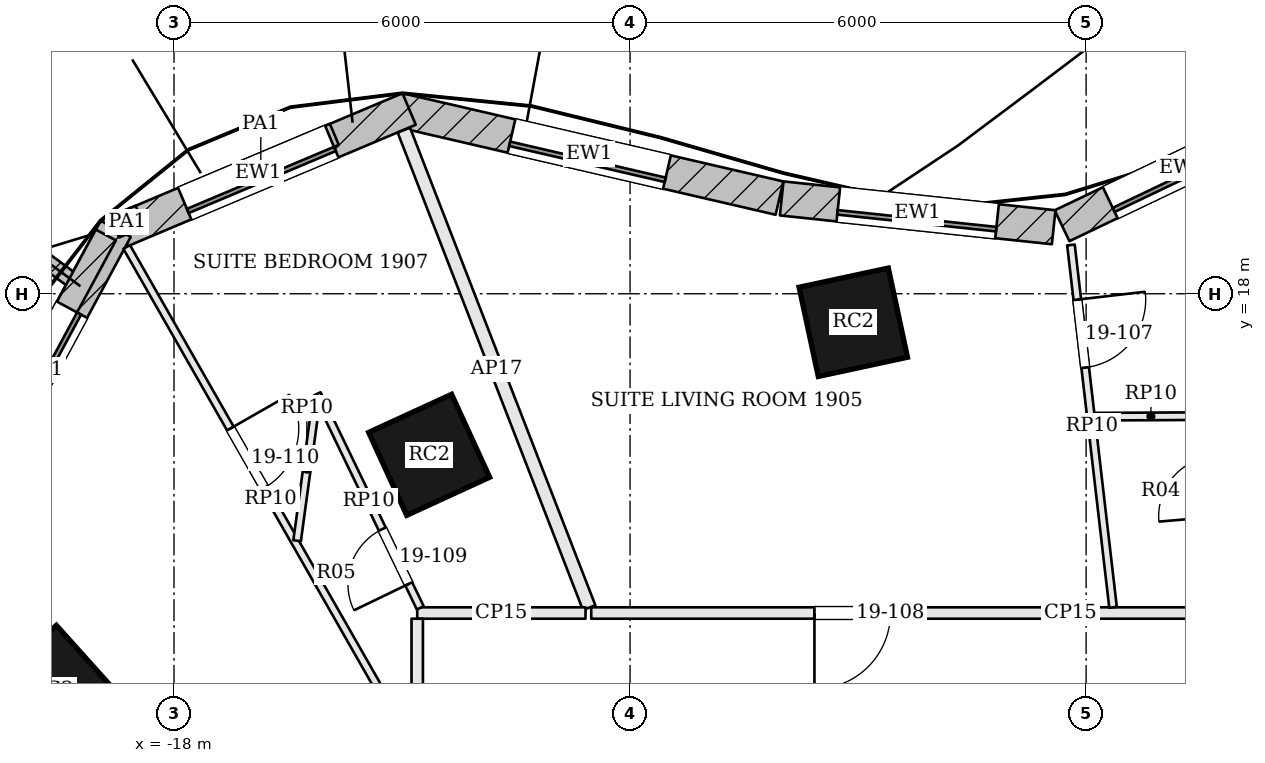
"""IFC4 building model, lengths in metres.
Left out: names, types, materials, properties, quantities, classifications, styles, units other than length and angle.
Written with IfcOpenShell. Run it as: python <this file> out.ifc"""

import sys

from ifc_helpers import new_model, si_unit, direction, frame, frame_2d, origin, origin_2d, place, context, subcontext, project, spatial, rectangle, extrude, element, fill, save


model = new_model("IFC4")
c1 = context("Model", 3, precision=1e-05, world=origin(), true_north=direction((0.0, 1.0)))
c2 = subcontext(c1, "Body", "Model", "MODEL_VIEW")
j1 = project(units=[si_unit("LENGTHUNIT", "METRE"), si_unit("PLANEANGLEUNIT", "RADIAN")], contexts=[c1])
p1 = place(None, origin())
s1 = spatial("IfcSite", under=j1, at=p1, CompositionType="ELEMENT")
p2 = place(p1, origin())
s2 = spatial("IfcBuilding", under=s1, at=p2, CompositionType="ELEMENT")
p3 = place(p2, frame((0.0, 0.0, 85.2)))
s3 = spatial("IfcBuildingStorey", under=s2, at=p3, CompositionType="ELEMENT", Elevation=85.2)
for number, where, z_axis, x_axis in (
    (1, (-9.063, 17.625, 0.0), (0.0, 0.0, 1.0), (-0.978, -0.21, 0.0)),
    (2, (-14.643, 15.881, 0.0), (0.0, 0.0, 1.0), (-0.909, -0.417, 0.0)),
    (3, (-19.593, 12.79, 0.0), (0.0, 0.0, 1.0), (-0.744, -0.668, 0.0)),
):
    element("IfcColumn", number, at=place(p3, frame(where, z_axis=z_axis, x_axis=x_axis)), inside=s3, PredefinedType="COLUMN", context=c2, shape_type="SweptSolid", body=[
        extrude(rectangle(XDim=1.2, YDim=1.2, at=origin_2d()), origin(), (0.0, 0.0, 1.0), 3.6),
    ])
p4 = place(p3, frame((-3.154, 20.406, 0.0), z_axis=(0.0, 0.0, 1.0), x_axis=(-0.902333313, -0.431038968367, 0.0)))
e4 = element("IfcWall", 4, at=p4, inside=s3, PredefinedType="SOLIDWALL", context=c2, shape_type="SweptSolid", body=[
    extrude(rectangle(XDim=3.505, YDim=0.45, at=frame_2d((1.753, 0.0))), origin(), (0.0, 0.0, 1.0), 3.4),
])
p5 = place(p4, frame((0.703, 0.0, 0.9)))
e5 = element("IfcOpeningElement", 5, at=p5, cuts=e4, PredefinedType="OPENING", context=c2, shape_type="SweptSolid", body=[
    extrude(rectangle(XDim=2.1, YDim=2.0, at=frame_2d((1.05, 1.0))), frame((0.0, 0.235, 0.0), z_axis=(0.0, -1.0, 0.0), x_axis=(1.0, 0.0, 0.0)), (0.0, 0.0, 1.0), 0.47),
])
p6 = place(p3, frame((-6.427, 18.875, 0.0), z_axis=(0.0, 0.0, 1.0), x_axis=(-0.994433468803, 0.10536638992, 0.0)))
e6 = element("IfcWall", 6, at=p6, inside=s3, PredefinedType="SOLIDWALL", context=c2, shape_type="SweptSolid", body=[
    extrude(rectangle(XDim=3.598, YDim=0.45, at=frame_2d((1.799, 0.0))), origin(), (0.0, 0.0, 1.0), 3.4),
])
p7 = place(p6, frame((0.749, 0.0, 0.9)))
e7 = element("IfcOpeningElement", 7, at=p7, cuts=e6, PredefinedType="OPENING", context=c2, shape_type="SweptSolid", body=[
    extrude(rectangle(XDim=2.1, YDim=2.0, at=frame_2d((1.05, 1.0))), frame((0.0, 0.235, 0.0), z_axis=(0.0, -1.0, 0.0), x_axis=(1.0, 0.0, 0.0)), (0.0, 0.0, 1.0), 0.47),
])
p8 = place(p3, frame((-10.034, 19.259, 0.0), z_axis=(0.0, 0.0, 1.0), x_axis=(-0.974223567844, 0.225584662283, 0.0)))
e8 = element("IfcWall", 8, at=p8, inside=s3, PredefinedType="SOLIDWALL", context=c2, shape_type="SweptSolid", body=[
    extrude(rectangle(XDim=5.139, YDim=0.45, at=frame_2d((2.569, 0.0))), origin(), (0.0, 0.0, 1.0), 3.4),
])
p9 = place(p8, frame((1.519, 0.0, 0.9)))
e9 = element("IfcOpeningElement", 9, at=p9, cuts=e8, PredefinedType="OPENING", context=c2, shape_type="SweptSolid", body=[
    extrude(rectangle(XDim=2.1, YDim=2.0, at=frame_2d((1.05, 1.0))), frame((0.0, 0.235, 0.0), z_axis=(0.0, -1.0, 0.0), x_axis=(1.0, 0.0, 0.0)), (0.0, 0.0, 1.0), 0.47),
])
p10 = place(p3, frame((-14.906, 20.431, 0.0), z_axis=(0.0, 0.0, 1.0), x_axis=(-0.921435803521, -0.388530642279, 0.0)))
e10 = element("IfcWall", 10, at=p10, inside=s3, PredefinedType="SOLIDWALL", context=c2, shape_type="SweptSolid", body=[
    extrude(rectangle(XDim=4.309, YDim=0.45, at=frame_2d((2.154, 0.0))), origin(), (0.0, 0.0, 1.0), 3.4),
])
p11 = place(p10, frame((1.104, 0.0, 0.9)))
e11 = element("IfcOpeningElement", 11, at=p11, cuts=e10, PredefinedType="OPENING", context=c2, shape_type="SweptSolid", body=[
    extrude(rectangle(XDim=2.1, YDim=2.0, at=frame_2d((1.05, 1.0))), frame((0.0, 0.235, 0.0), z_axis=(0.0, -1.0, 0.0), x_axis=(1.0, 0.0, 0.0)), (0.0, 0.0, 1.0), 0.47),
])
p12 = place(p3, frame((-18.767, 18.854, 0.0), z_axis=(0.0, 0.0, 1.0), x_axis=(-0.474475888716, -0.880268499395, 0.0)))
e12 = element("IfcWall", 12, at=p12, inside=s3, PredefinedType="SOLIDWALL", context=c2, shape_type="SweptSolid", body=[
    extrude(rectangle(XDim=4.219, YDim=0.45, at=frame_2d((2.11, 0.0))), origin(), (0.0, 0.0, 1.0), 3.4),
])
p13 = place(p12, frame((1.21, 0.0, 0.9)))
e13 = element("IfcOpeningElement", 13, at=p13, cuts=e12, PredefinedType="OPENING", context=c2, shape_type="SweptSolid", body=[
    extrude(rectangle(XDim=1.8, YDim=2.0, at=frame_2d((0.9, 1.0))), frame((0.0, 0.235, 0.0), z_axis=(0.0, -1.0, 0.0), x_axis=(1.0, 0.0, 0.0)), (0.0, 0.0, 1.0), 0.47),
])
p14 = place(p3, frame((-19.231, 18.099, 0.0), z_axis=(0.0, 0.0, 1.0), x_axis=(-0.806085538754, 0.591799040394, 0.0)))
e14 = element("IfcWall", 14, at=p14, inside=s3, PredefinedType="SOLIDWALL", context=c2, shape_type="SweptSolid", body=[
    extrude(rectangle(XDim=1.75, YDim=0.2, at=frame_2d((0.875, 0.0))), origin(), (0.0, 0.0, 1.0), 3.4),
])
p15 = place(p3, frame((-15.891, 20.097, 3.6), z_axis=(0.0, 0.0, 1.0), x_axis=(-0.921468908678, -0.388452121038, 0.0)))
e15 = element("IfcWall", 15, at=p15, inside=s3, PredefinedType="PARAPET", context=c2, shape_type="SweptSolid", body=[
    extrude(rectangle(XDim=2.099, YDim=0.3, at=frame_2d((1.05, 0.0))), origin(), (0.0, 0.0, 1.0), 1.1),
])
p16 = place(p3, frame((-18.446, 19.02, 3.6), z_axis=(0.0, 0.0, 1.0), x_axis=(-0.921356634102, -0.388718346358, 0.0)))
e16 = element("IfcWall", 16, at=p16, inside=s3, PredefinedType="PARAPET", context=c2, shape_type="SweptSolid", body=[
    extrude(rectangle(XDim=0.363, YDim=0.3, at=frame_2d((0.182, 0.0))), origin(), (0.0, 0.0, 1.0), 1.1),
])
p17 = place(p3, frame((-18.896, 18.773, 3.6), z_axis=(0.0, 0.0, 1.0), x_axis=(-0.474444905835, -0.880285198857, 0.0)))
e17 = element("IfcWall", 17, at=p17, inside=s3, PredefinedType="PARAPET", context=c2, shape_type="SweptSolid", body=[
    extrude(rectangle(XDim=4.05, YDim=0.3, at=frame_2d((2.025, 0.0))), origin(), (0.0, 0.0, 1.0), 1.1),
])
p18 = place(p3, frame((0.098, 13.8, 0.0), z_axis=(0.0, 0.0, 1.0), x_axis=(-1.0, 0.0, 0.0)))
e18 = element("IfcWall", 18, at=p18, inside=s3, PredefinedType="PARTITIONING", context=c2, shape_type="SweptSolid", body=[
    extrude(rectangle(XDim=12.609, YDim=0.15, at=frame_2d((6.304, 0.0))), origin(), (0.0, 0.0, 1.0), 2.784),
])
p19 = place(p18, frame((8.672, 0.0, 0.0)))
e19 = element("IfcOpeningElement", 19, at=p19, cuts=e18, PredefinedType="OPENING", context=c2, shape_type="SweptSolid", body=[
    extrude(rectangle(XDim=1.0, YDim=2.1, at=frame_2d((0.5, 1.05))), frame((0.0, 0.085, 0.0), z_axis=(0.0, -1.0, 0.0), x_axis=(1.0, 0.0, 0.0)), (0.0, 0.0, 1.0), 0.17),
])
p20 = place(p3, frame((-14.976, 20.153, 0.0), z_axis=(0.0, 0.0, 1.0), x_axis=(0.361720652029, -0.932286527788, 0.0)))
e20 = element("IfcWall", 20, at=p20, inside=s3, PredefinedType="PARTITIONING", context=c2, shape_type="SweptSolid", body=[
    extrude(rectangle(XDim=6.739, YDim=0.175, at=frame_2d((3.37, 0.0))), origin(), (0.0, 0.0, 1.0), 2.784),
])
p21 = place(p3, frame((-12.586, 13.8, 0.0), z_axis=(0.0, 0.0, 1.0), x_axis=(-1.0, 0.0, 0.0)))
e21 = element("IfcWall", 21, at=p21, inside=s3, PredefinedType="PARTITIONING", context=c2, shape_type="SweptSolid", body=[
    extrude(rectangle(XDim=2.214, YDim=0.15, at=frame_2d((1.107, 0.0))), origin(), (0.0, 0.0, 1.0), 2.784),
])
p22 = place(p3, frame((-14.8, 13.725, 0.0), z_axis=(0.0, 0.0, 1.0), x_axis=(0.0, -1.0, 0.0)))
e22 = element("IfcWall", 22, at=p22, inside=s3, PredefinedType="PARTITIONING", context=c2, shape_type="SweptSolid", body=[
    extrude(rectangle(XDim=3.228, YDim=0.15, at=frame_2d((1.614, 0.0))), origin(), (0.0, 0.0, 1.0), 2.784),
])
p23 = place(p3, frame((-6.199, 18.642, 0.0), z_axis=(0.0, 0.0, 1.0), x_axis=(0.115421487153, -0.993316606276, 0.0)))
e23 = element("IfcWall", 23, at=p23, inside=s3, PredefinedType="PARTITIONING", context=c2, shape_type="SweptSolid", body=[
    extrude(rectangle(XDim=4.799, YDim=0.1, at=frame_2d((2.4, 0.0))), origin(), (0.0, 0.0, 1.0), 2.784),
])
p24 = place(p23, frame((0.724, 0.0, 0.0)))
e24 = element("IfcOpeningElement", 24, at=p24, cuts=e23, PredefinedType="OPENING", context=c2, shape_type="SweptSolid", body=[
    extrude(rectangle(XDim=0.9, YDim=2.4, at=frame_2d((0.45, 1.2))), frame((0.0, 0.06, 0.0), z_axis=(0.0, -1.0, 0.0), x_axis=(1.0, 0.0, 0.0)), (0.0, 0.0, 1.0), 0.12),
])
p25 = place(p3, frame((-4.408, 16.39, 0.0), z_axis=(0.0, 0.0, 1.0), x_axis=(-0.999987730333, -0.00495370408, 0.0)))
e25 = element("IfcWall", 25, at=p25, inside=s3, PredefinedType="PARTITIONING", context=c2, shape_type="SweptSolid", body=[
    extrude(rectangle(XDim=1.479, YDim=0.1, at=frame_2d((0.739, 0.0))), origin(), (0.0, 0.0, 1.0), 2.784),
])
p26 = place(p3, frame((-18.622, 18.615, 0.0), z_axis=(0.0, 0.0, 1.0), x_axis=(0.495932236656, -0.868361224748, 0.0)))
e26 = element("IfcWall", 26, at=p26, inside=s3, PredefinedType="PARTITIONING", context=c2, shape_type="SweptSolid", body=[
    extrude(rectangle(XDim=7.632, YDim=0.1, at=frame_2d((3.816, 0.0))), origin(), (0.0, 0.0, 1.0), 2.784),
])
p27 = place(p26, frame((2.75, 0.0, 0.0)))
e27 = element("IfcOpeningElement", 27, at=p27, cuts=e26, PredefinedType="OPENING", context=c2, shape_type="SweptSolid", body=[
    extrude(rectangle(XDim=0.9, YDim=2.4, at=frame_2d((0.45, 1.2))), frame((0.0, 0.06, 0.0), z_axis=(0.0, -1.0, 0.0), x_axis=(1.0, 0.0, 0.0)), (0.0, 0.0, 1.0), 0.12),
])
p28 = place(p3, frame((-14.76, 13.868, 0.0), z_axis=(0.0, 0.0, 1.0), x_axis=(-0.434322957958, 0.900757219338, 0.0)))
e28 = element("IfcWall", 28, at=p28, inside=s3, PredefinedType="PARTITIONING", context=c2, shape_type="SweptSolid", body=[
    extrude(rectangle(XDim=3.125, YDim=0.1, at=frame_2d((1.562, 0.0))), origin(), (0.0, 0.0, 1.0), 2.784),
])
p29 = place(p28, frame((0.35, 0.0, 0.0)))
e29 = element("IfcOpeningElement", 29, at=p29, cuts=e28, PredefinedType="OPENING", context=c2, shape_type="SweptSolid", body=[
    extrude(rectangle(XDim=0.8, YDim=2.1, at=frame_2d((0.4, 1.05))), frame((0.0, 0.06, 0.0), z_axis=(0.0, -1.0, 0.0), x_axis=(1.0, 0.0, 0.0)), (0.0, 0.0, 1.0), 0.12),
])
p30 = place(p3, frame((-16.124, 16.633, 0.0), z_axis=(0.0, 0.0, 1.0), x_axis=(-0.134975529172, -0.990848932242, 0.0)))
e30 = element("IfcWall", 30, at=p30, inside=s3, PredefinedType="PARTITIONING", context=c2, shape_type="SweptSolid", body=[
    extrude(rectangle(XDim=1.899, YDim=0.1, at=frame_2d((0.95, 0.0))), origin(), (0.0, 0.0, 1.0), 2.784),
])
p31 = place(p5, origin())
e31 = element("IfcWindow", 31, at=p31, inside=s3, PartitioningType="SINGLE_PANEL", PredefinedType="WINDOW", context=c2, shape_type="SweptSolid", body=[
    extrude(rectangle(XDim=2.1, YDim=2.0, at=frame_2d((1.05, 1.0))), frame((0.0, 0.135, 0.0), z_axis=(0.0, -1.0, 0.0), x_axis=(1.0, 0.0, 0.0)), (0.0, 0.0, 1.0), 0.06),
])
fill(e5, e31)
p32 = place(p7, origin())
e32 = element("IfcWindow", 32, at=p32, inside=s3, PartitioningType="SINGLE_PANEL", PredefinedType="WINDOW", context=c2, shape_type="SweptSolid", body=[
    extrude(rectangle(XDim=2.1, YDim=2.0, at=frame_2d((1.05, 1.0))), frame((0.0, 0.135, 0.0), z_axis=(0.0, -1.0, 0.0), x_axis=(1.0, 0.0, 0.0)), (0.0, 0.0, 1.0), 0.06),
])
fill(e7, e32)
p33 = place(p9, origin())
e33 = element("IfcWindow", 33, at=p33, inside=s3, PartitioningType="SINGLE_PANEL", PredefinedType="WINDOW", context=c2, shape_type="SweptSolid", body=[
    extrude(rectangle(XDim=2.1, YDim=2.0, at=frame_2d((1.05, 1.0))), frame((0.0, 0.135, 0.0), z_axis=(0.0, -1.0, 0.0), x_axis=(1.0, 0.0, 0.0)), (0.0, 0.0, 1.0), 0.06),
])
fill(e9, e33)
p34 = place(p11, origin())
e34 = element("IfcWindow", 34, at=p34, inside=s3, PartitioningType="SINGLE_PANEL", PredefinedType="WINDOW", context=c2, shape_type="SweptSolid", body=[
    extrude(rectangle(XDim=2.1, YDim=2.0, at=frame_2d((1.05, 1.0))), frame((0.0, 0.135, 0.0), z_axis=(0.0, -1.0, 0.0), x_axis=(1.0, 0.0, 0.0)), (0.0, 0.0, 1.0), 0.06),
])
fill(e11, e34)
p35 = place(p13, origin())
e35 = element("IfcWindow", 35, at=p35, inside=s3, PartitioningType="SINGLE_PANEL", PredefinedType="WINDOW", context=c2, shape_type="SweptSolid", body=[
    extrude(rectangle(XDim=1.8, YDim=2.0, at=frame_2d((0.9, 1.0))), frame((0.0, 0.135, 0.0), z_axis=(0.0, -1.0, 0.0), x_axis=(1.0, 0.0, 0.0)), (0.0, 0.0, 1.0), 0.06),
])
fill(e13, e35)
p36 = place(p24, origin())
e36 = element("IfcDoor", 36, at=p36, inside=s3, OperationType="SINGLE_SWING_LEFT", PredefinedType="DOOR", context=c2, shape_type="SweptSolid", body=[
    extrude(rectangle(XDim=0.9, YDim=2.4, at=frame_2d((0.45, 1.2))), frame((0.0, 0.025, 0.0), z_axis=(0.0, -1.0, 0.0), x_axis=(1.0, 0.0, 0.0)), (0.0, 0.0, 1.0), 0.05),
])
fill(e24, e36)
p37 = place(p19, origin())
e37 = element("IfcDoor", 37, at=p37, inside=s3, OperationType="SINGLE_SWING_RIGHT", PredefinedType="DOOR", context=c2, shape_type="SweptSolid", body=[
    extrude(rectangle(XDim=1.0, YDim=2.1, at=frame_2d((0.5, 1.05))), frame((0.0, 0.025, 0.0), z_axis=(0.0, -1.0, 0.0), x_axis=(1.0, 0.0, 0.0)), (0.0, 0.0, 1.0), 0.05),
])
fill(e19, e37)
p38 = place(p29, origin())
e38 = element("IfcDoor", 38, at=p38, inside=s3, OperationType="SINGLE_SWING_LEFT", PredefinedType="DOOR", context=c2, shape_type="SweptSolid", body=[
    extrude(rectangle(XDim=0.8, YDim=2.1, at=frame_2d((0.4, 1.05))), frame((0.0, 0.025, 0.0), z_axis=(0.0, -1.0, 0.0), x_axis=(1.0, 0.0, 0.0)), (0.0, 0.0, 1.0), 0.05),
])
fill(e29, e38)
p39 = place(p27, origin())
e39 = element("IfcDoor", 39, at=p39, inside=s3, OperationType="SINGLE_SWING_LEFT", PredefinedType="DOOR", context=c2, shape_type="SweptSolid", body=[
    extrude(rectangle(XDim=0.9, YDim=2.4, at=frame_2d((0.45, 1.2))), frame((0.0, 0.025, 0.0), z_axis=(0.0, -1.0, 0.0), x_axis=(1.0, 0.0, 0.0)), (0.0, 0.0, 1.0), 0.05),
])
fill(e27, e39)
save(model, sys.argv[1])
